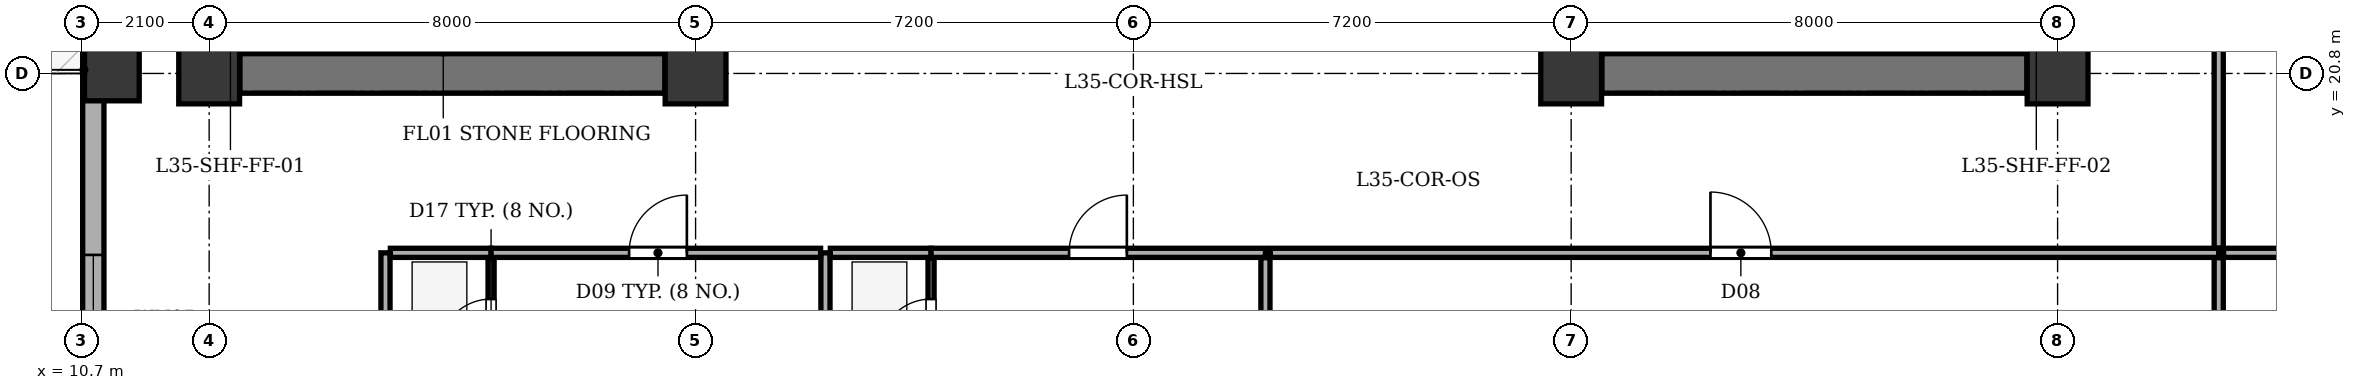
"""IFC4 building model, lengths in metres.
Left out: names, types, materials, properties, quantities, classifications, styles, units other than length and angle.
Written with IfcOpenShell. Run it as: python <this file> out.ifc"""

import sys

from ifc_helpers import new_model, si_unit, direction, frame, frame_2d, origin, origin_2d, place, context, subcontext, project, spatial, rectangle, extrude, element, fill, save


model = new_model("IFC4")
c1 = context("Model", 3, precision=1e-05, world=origin(), true_north=direction((0.0, 1.0)))
c2 = subcontext(c1, "Body", "Model", "MODEL_VIEW")
j1 = project(units=[si_unit("LENGTHUNIT", "METRE"), si_unit("PLANEANGLEUNIT", "RADIAN")], contexts=[c1])
p1 = place(None, origin())
s1 = spatial("IfcSite", under=j1, at=p1, CompositionType="ELEMENT")
p2 = place(p1, origin())
s2 = spatial("IfcBuilding", under=s1, at=p2, CompositionType="ELEMENT")
p3 = place(p2, frame((0.0, 0.0, 141.3)))
s3 = spatial("IfcBuildingStorey", under=s2, at=p3, CompositionType="ELEMENT", Elevation=141.3)
for number, where, z_axis, x_axis in (
    (1, (12.8, 20.8, 0.0), (0.0, 0.0, 1.0), (1.0, 0.0, 0.0)),
    (2, (20.8, 20.8, 0.0), (0.0, 0.0, 1.0), (1.0, 0.0, 0.0)),
    (3, (35.2, 20.8, 0.0), (0.0, 0.0, 1.0), (1.0, 0.0, 0.0)),
    (4, (43.2, 20.8, 0.0), (0.0, 0.0, 1.0), (1.0, 0.0, 0.0)),
):
    element("IfcColumn", number, at=place(p3, frame(where, z_axis=z_axis, x_axis=x_axis)), inside=s3, PredefinedType="COLUMN", context=c2, shape_type="SweptSolid", body=[
        extrude(rectangle(XDim=1.0, YDim=1.0, at=origin_2d()), origin(), (0.0, 0.0, 1.0), 3.5),
    ])
p4 = place(p3, frame((11.2, 20.8, 0.0), z_axis=(0.0, 0.0, 1.0), x_axis=(1.0, 0.0, 0.0)))
e5 = element("IfcColumn", 5, at=p4, inside=s3, PredefinedType="COLUMN", context=c2, shape_type="SweptSolid", body=[
    extrude(rectangle(XDim=0.9, YDim=0.9, at=origin_2d()), origin(), (0.0, 0.0, 1.0), 3.5),
])
p5 = place(p3, frame((10.895, 6.5, 0.0), z_axis=(0.0, 0.0, 1.0), x_axis=(0.0, 1.0, 0.0)))
e6 = element("IfcWall", 6, at=p5, inside=s3, PredefinedType="STANDARD", context=c2, shape_type="SweptSolid", body=[
    extrude(rectangle(XDim=35.0, YDim=0.35, at=frame_2d((17.5, 0.0))), origin(), (0.0, 0.0, 1.0), 2.785),
])
p6 = place(p5, frame((20.15, 0.0, 0.0)))
e7 = element("IfcOpeningElement", 7, at=p6, cuts=e6, PredefinedType="OPENING", context=c2, shape_type="SweptSolid", body=[
    extrude(rectangle(XDim=1.1, YDim=2.05, at=frame_2d((0.55, 1.025))), frame((0.0, 0.185, 0.0), z_axis=(0.0, -1.0, 0.0), x_axis=(1.0, 0.0, 0.0)), (0.0, 0.0, 1.0), 0.37),
])
p7 = place(p5, frame((3.31, 0.0, 0.75)))
e8 = element("IfcOpeningElement", 8, at=p7, cuts=e6, PredefinedType="OPENING", context=c2, shape_type="SweptSolid", body=[
    extrude(rectangle(XDim=1.6, YDim=1.75, at=frame_2d((0.8, 0.875))), frame((0.0, 0.185, 0.0), z_axis=(0.0, -1.0, 0.0), x_axis=(1.0, 0.0, 0.0)), (0.0, 0.0, 1.0), 0.37),
])
p8 = place(p5, frame((9.216, 0.0, 0.75)))
e9 = element("IfcOpeningElement", 9, at=p8, cuts=e6, PredefinedType="OPENING", context=c2, shape_type="SweptSolid", body=[
    extrude(rectangle(XDim=2.1, YDim=1.75, at=frame_2d((1.05, 0.875))), frame((0.0, 0.185, 0.0), z_axis=(0.0, -1.0, 0.0), x_axis=(1.0, 0.0, 0.0)), (0.0, 0.0, 1.0), 0.37),
])
p9 = place(p5, frame((16.4, 0.0, 0.75)))
e10 = element("IfcOpeningElement", 10, at=p9, cuts=e6, PredefinedType="OPENING", context=c2, shape_type="SweptSolid", body=[
    extrude(rectangle(XDim=1.6, YDim=1.75, at=frame_2d((0.8, 0.875))), frame((0.0, 0.185, 0.0), z_axis=(0.0, -1.0, 0.0), x_axis=(1.0, 0.0, 0.0)), (0.0, 0.0, 1.0), 0.37),
])
p10 = place(p5, frame((23.4, 0.0, 0.75)))
e11 = element("IfcOpeningElement", 11, at=p10, cuts=e6, PredefinedType="OPENING", context=c2, shape_type="SweptSolid", body=[
    extrude(rectangle(XDim=1.6, YDim=1.75, at=frame_2d((0.8, 0.875))), frame((0.0, 0.185, 0.0), z_axis=(0.0, -1.0, 0.0), x_axis=(1.0, 0.0, 0.0)), (0.0, 0.0, 1.0), 0.37),
])
p11 = place(p5, frame((28.671, 0.0, 0.75)))
e12 = element("IfcOpeningElement", 12, at=p11, cuts=e6, PredefinedType="OPENING", context=c2, shape_type="SweptSolid", body=[
    extrude(rectangle(XDim=1.6, YDim=1.75, at=frame_2d((0.8, 0.875))), frame((0.0, 0.185, 0.0), z_axis=(0.0, -1.0, 0.0), x_axis=(1.0, 0.0, 0.0)), (0.0, 0.0, 1.0), 0.37),
])
p12 = place(p5, frame((31.755, 0.0, 0.75)))
e13 = element("IfcOpeningElement", 13, at=p12, cuts=e6, PredefinedType="OPENING", context=c2, shape_type="SweptSolid", body=[
    extrude(rectangle(XDim=1.6, YDim=1.75, at=frame_2d((0.8, 0.875))), frame((0.0, 0.185, 0.0), z_axis=(0.0, -1.0, 0.0), x_axis=(1.0, 0.0, 0.0)), (0.0, 0.0, 1.0), 0.37),
])
p13 = place(p3, frame((13.305, 20.8, 0.0), z_axis=(0.0, 0.0, 1.0), x_axis=(1.0, 0.0, 0.0)))
e14 = element("IfcWall", 14, at=p13, inside=s3, PredefinedType="SHEAR", context=c2, shape_type="SweptSolid", body=[
    extrude(rectangle(XDim=6.99, YDim=0.65, at=frame_2d((3.495, 0.0))), origin(), (0.0, 0.0, 1.0), 3.2),
])
p14 = place(p3, frame((16.435, 21.135, 0.0), z_axis=(0.0, 0.0, 1.0), x_axis=(0.0, 1.0, 0.0)))
e15 = element("IfcWall", 15, at=p14, inside=s3, PredefinedType="SHEAR", context=c2, shape_type="SweptSolid", body=[
    extrude(rectangle(XDim=12.13, YDim=0.25, at=frame_2d((6.065, 0.0))), origin(), (0.0, 0.0, 1.0), 3.2),
])
p15 = place(p14, frame((0.515, 0.0, 0.0)))
e16 = element("IfcOpeningElement", 16, at=p15, cuts=e15, PredefinedType="OPENING", context=c2, shape_type="SweptSolid", body=[
    extrude(rectangle(XDim=1.2, YDim=2.15, at=frame_2d((0.6, 1.075))), frame((0.0, 0.135, 0.0), z_axis=(0.0, -1.0, 0.0), x_axis=(1.0, 0.0, 0.0)), (0.0, 0.0, 1.0), 0.27),
])
p16 = place(p14, frame((2.665, 0.0, 0.0)))
e17 = element("IfcOpeningElement", 17, at=p16, cuts=e15, PredefinedType="OPENING", context=c2, shape_type="SweptSolid", body=[
    extrude(rectangle(XDim=1.15, YDim=2.15, at=frame_2d((0.575, 1.075))), frame((0.0, 0.135, 0.0), z_axis=(0.0, -1.0, 0.0), x_axis=(1.0, 0.0, 0.0)), (0.0, 0.0, 1.0), 0.27),
])
p17 = place(p3, frame((35.705, 20.8, 0.0), z_axis=(0.0, 0.0, 1.0), x_axis=(1.0, 0.0, 0.0)))
e18 = element("IfcWall", 18, at=p17, inside=s3, PredefinedType="SHEAR", context=c2, shape_type="SweptSolid", body=[
    extrude(rectangle(XDim=6.99, YDim=0.65, at=frame_2d((3.495, 0.0))), origin(), (0.0, 0.0, 1.0), 3.2),
])
p18 = place(p3, frame((39.565, 21.135, 0.0), z_axis=(0.0, 0.0, 1.0), x_axis=(0.0, 1.0, 0.0)))
e19 = element("IfcWall", 19, at=p18, inside=s3, PredefinedType="SHEAR", context=c2, shape_type="SweptSolid", body=[
    extrude(rectangle(XDim=12.13, YDim=0.25, at=frame_2d((6.065, 0.0))), origin(), (0.0, 0.0, 1.0), 3.2),
])
p19 = place(p18, frame((0.515, 0.0, 0.0)))
e20 = element("IfcOpeningElement", 20, at=p19, cuts=e19, PredefinedType="OPENING", context=c2, shape_type="SweptSolid", body=[
    extrude(rectangle(XDim=1.2, YDim=2.15, at=frame_2d((0.6, 1.075))), frame((0.0, 0.135, 0.0), z_axis=(0.0, -1.0, 0.0), x_axis=(1.0, 0.0, 0.0)), (0.0, 0.0, 1.0), 0.27),
])
p20 = place(p18, frame((2.665, 0.0, 0.0)))
e21 = element("IfcOpeningElement", 21, at=p20, cuts=e19, PredefinedType="OPENING", context=c2, shape_type="SweptSolid", body=[
    extrude(rectangle(XDim=1.15, YDim=2.15, at=frame_2d((0.575, 1.075))), frame((0.0, 0.135, 0.0), z_axis=(0.0, -1.0, 0.0), x_axis=(1.0, 0.0, 0.0)), (0.0, 0.0, 1.0), 0.27),
])
for number, where, z_axis, x_axis in (
    (22, (15.7, 1.875, 0.0), (0.0, 0.0, 1.0), (0.0, 1.0, 0.0)),
    (23, (22.936, 1.875, 0.0), (0.0, 0.0, 1.0), (0.0, 1.0, 0.0)),
):
    element("IfcWall", number, at=place(p3, frame(where, z_axis=z_axis, x_axis=x_axis)), inside=s3, PredefinedType="PARTITIONING", context=c2, shape_type="SweptSolid", body=[
        extrude(rectangle(XDim=15.975, YDim=0.15, at=frame_2d((7.988, 0.0))), origin(), (0.0, 0.0, 1.0), 3.2),
    ])
p21 = place(p3, frame((15.78, 17.85, 0.0), z_axis=(0.0, 0.0, 1.0), x_axis=(1.0, 0.0, 0.0)))
e24 = element("IfcWall", 24, at=p21, inside=s3, PredefinedType="PARTITIONING", context=c2, shape_type="SweptSolid", body=[
    extrude(rectangle(XDim=1.656, YDim=0.15, at=frame_2d((0.828, 0.0))), origin(), (0.0, 0.0, 1.0), 3.2),
])
p22 = place(p3, frame((17.437, 17.85, 0.0), z_axis=(0.0, 0.0, 1.0), x_axis=(1.0, 0.0, 0.0)))
e25 = element("IfcWall", 25, at=p22, inside=s3, PredefinedType="PARTITIONING", context=c2, shape_type="SweptSolid", body=[
    extrude(rectangle(XDim=5.419, YDim=0.15, at=frame_2d((2.71, 0.0))), origin(), (0.0, 0.0, 1.0), 3.2),
])
p23 = place(p22, frame((2.27, 0.0, 0.0)))
e26 = element("IfcOpeningElement", 26, at=p23, cuts=e25, PredefinedType="OPENING", context=c2, shape_type="SweptSolid", body=[
    extrude(rectangle(XDim=0.95, YDim=2.1, at=frame_2d((0.475, 1.05))), frame((0.0, 0.085, 0.0), z_axis=(0.0, -1.0, 0.0), x_axis=(1.0, 0.0, 0.0)), (0.0, 0.0, 1.0), 0.17),
])
p24 = place(p3, frame((17.437, 15.52, 0.0), z_axis=(0.0, 0.0, 1.0), x_axis=(0.0, 1.0, 0.0)))
e27 = element("IfcWall", 27, at=p24, inside=s3, PredefinedType="PARTITIONING", context=c2, shape_type="SweptSolid", body=[
    extrude(rectangle(XDim=2.25, YDim=0.1, at=frame_2d((1.125, 0.0))), origin(), (0.0, 0.0, 1.0), 3.2),
])
p25 = place(p24, frame((0.72, 0.0, 0.0)))
e28 = element("IfcOpeningElement", 28, at=p25, cuts=e27, PredefinedType="OPENING", context=c2, shape_type="SweptSolid", body=[
    extrude(rectangle(XDim=0.85, YDim=2.05, at=frame_2d((0.425, 1.025))), frame((0.0, 0.06, 0.0), z_axis=(0.0, -1.0, 0.0), x_axis=(1.0, 0.0, 0.0)), (0.0, 0.0, 1.0), 0.12),
])
p26 = place(p3, frame((23.016, 17.85, 0.0), z_axis=(0.0, 0.0, 1.0), x_axis=(1.0, 0.0, 0.0)))
e29 = element("IfcWall", 29, at=p26, inside=s3, PredefinedType="PARTITIONING", context=c2, shape_type="SweptSolid", body=[
    extrude(rectangle(XDim=1.656, YDim=0.15, at=frame_2d((0.828, 0.0))), origin(), (0.0, 0.0, 1.0), 3.2),
])
p27 = place(p3, frame((24.673, 17.85, 0.0), z_axis=(0.0, 0.0, 1.0), x_axis=(1.0, 0.0, 0.0)))
e30 = element("IfcWall", 30, at=p27, inside=s3, PredefinedType="PARTITIONING", context=c2, shape_type="SweptSolid", body=[
    extrude(rectangle(XDim=5.5, YDim=0.15, at=frame_2d((2.75, 0.0))), origin(), (0.0, 0.0, 1.0), 3.2),
])
p28 = place(p27, frame((2.27, 0.0, 0.0)))
e31 = element("IfcOpeningElement", 31, at=p28, cuts=e30, PredefinedType="OPENING", context=c2, shape_type="SweptSolid", body=[
    extrude(rectangle(XDim=0.95, YDim=2.1, at=frame_2d((0.475, 1.05))), frame((0.0, 0.085, 0.0), z_axis=(0.0, -1.0, 0.0), x_axis=(1.0, 0.0, 0.0)), (0.0, 0.0, 1.0), 0.17),
])
p29 = place(p3, frame((24.673, 15.52, 0.0), z_axis=(0.0, 0.0, 1.0), x_axis=(0.0, 1.0, 0.0)))
e32 = element("IfcWall", 32, at=p29, inside=s3, PredefinedType="PARTITIONING", context=c2, shape_type="SweptSolid", body=[
    extrude(rectangle(XDim=2.25, YDim=0.1, at=frame_2d((1.125, 0.0))), origin(), (0.0, 0.0, 1.0), 3.2),
])
p30 = place(p29, frame((0.72, 0.0, 0.0)))
e33 = element("IfcOpeningElement", 33, at=p30, cuts=e32, PredefinedType="OPENING", context=c2, shape_type="SweptSolid", body=[
    extrude(rectangle(XDim=0.85, YDim=2.05, at=frame_2d((0.425, 1.025))), frame((0.0, 0.06, 0.0), z_axis=(0.0, -1.0, 0.0), x_axis=(1.0, 0.0, 0.0)), (0.0, 0.0, 1.0), 0.12),
])
p31 = place(p3, frame((30.172, 1.875, 0.0), z_axis=(0.0, 0.0, 1.0), x_axis=(0.0, 1.0, 0.0)))
e34 = element("IfcWall", 34, at=p31, inside=s3, PredefinedType="PARTITIONING", context=c2, shape_type="SweptSolid", body=[
    extrude(rectangle(XDim=15.895, YDim=0.15, at=frame_2d((7.948, 0.0))), origin(), (0.0, 0.0, 1.0), 3.2),
])
p32 = place(p3, frame((30.252, 17.85, 0.0), z_axis=(0.0, 0.0, 1.0), x_axis=(1.0, 0.0, 0.0)))
e35 = element("IfcWall", 35, at=p32, inside=s3, PredefinedType="PARTITIONING", context=c2, shape_type="SweptSolid", body=[
    extrude(rectangle(XDim=15.598, YDim=0.15, at=frame_2d((7.799, 0.0))), origin(), (0.0, 0.0, 1.0), 3.2),
])
p33 = place(p32, frame((7.239, 0.0, 0.0)))
e36 = element("IfcOpeningElement", 36, at=p33, cuts=e35, PredefinedType="OPENING", context=c2, shape_type="SweptSolid", body=[
    extrude(rectangle(XDim=1.0, YDim=2.1, at=frame_2d((0.5, 1.05))), frame((0.0, 0.085, 0.0), z_axis=(0.0, -1.0, 0.0), x_axis=(1.0, 0.0, 0.0)), (0.0, 0.0, 1.0), 0.17),
])
p34 = place(p3, frame((45.85, 1.875, 0.0), z_axis=(0.0, 0.0, 1.0), x_axis=(0.0, 1.0, 0.0)))
e37 = element("IfcWall", 37, at=p34, inside=s3, PredefinedType="PARTITIONING", context=c2, shape_type="SweptSolid", body=[
    extrude(rectangle(XDim=15.895, YDim=0.15, at=frame_2d((7.948, 0.0))), origin(), (0.0, 0.0, 1.0), 3.2),
])
p35 = place(p3, frame((45.93, 17.85, 0.0), z_axis=(0.0, 0.0, 1.0), x_axis=(1.0, 0.0, 0.0)))
e38 = element("IfcWall", 38, at=p35, inside=s3, PredefinedType="PARTITIONING", context=c2, shape_type="SweptSolid", body=[
    extrude(rectangle(XDim=9.395, YDim=0.15, at=frame_2d((4.698, 0.0))), origin(), (0.0, 0.0, 1.0), 3.2),
])
p36 = place(p3, frame((45.85, 17.93, 0.0), z_axis=(0.0, 0.0, 1.0), x_axis=(0.0, 1.0, 0.0)))
e39 = element("IfcWall", 39, at=p36, inside=s3, PredefinedType="PARTITIONING", context=c2, shape_type="SweptSolid", body=[
    extrude(rectangle(XDim=18.54, YDim=0.15, at=frame_2d((9.27, 0.0))), origin(), (0.0, 0.0, 1.0), 3.2),
])
p37 = place(p36, frame((8.79, 0.0, 0.0)))
e40 = element("IfcOpeningElement", 40, at=p37, cuts=e39, PredefinedType="OPENING", context=c2, shape_type="SweptSolid", body=[
    extrude(rectangle(XDim=0.95, YDim=2.1, at=frame_2d((0.475, 1.05))), frame((0.0, 0.085, 0.0), z_axis=(0.0, -1.0, 0.0), x_axis=(1.0, 0.0, 0.0)), (0.0, 0.0, 1.0), 0.17),
])
p38 = place(p8, origin())
e41 = element("IfcWindow", 41, at=p38, inside=s3, PartitioningType="SINGLE_PANEL", PredefinedType="WINDOW", context=c2, shape_type="SweptSolid", body=[
    extrude(rectangle(XDim=2.1, YDim=1.75, at=frame_2d((1.05, 0.875))), frame((0.0, -0.01, 0.0), z_axis=(0.0, -1.0, 0.0), x_axis=(1.0, 0.0, 0.0)), (0.0, 0.0, 1.0), 0.06),
])
fill(e9, e41)
p39 = place(p25, origin())
e42 = element("IfcDoor", 42, at=p39, inside=s3, OperationType="SINGLE_SWING_LEFT", PredefinedType="DOOR", context=c2, shape_type="SweptSolid", body=[
    extrude(rectangle(XDim=0.85, YDim=2.05, at=frame_2d((0.425, 1.025))), frame((0.0, 0.025, 0.0), z_axis=(0.0, -1.0, 0.0), x_axis=(1.0, 0.0, 0.0)), (0.0, 0.0, 1.0), 0.05),
])
fill(e28, e42)
p40 = place(p23, origin())
e43 = element("IfcDoor", 43, at=p40, inside=s3, OperationType="SINGLE_SWING_RIGHT", PredefinedType="DOOR", context=c2, shape_type="SweptSolid", body=[
    extrude(rectangle(XDim=0.95, YDim=2.1, at=frame_2d((0.475, 1.05))), frame((0.0, 0.025, 0.0), z_axis=(0.0, -1.0, 0.0), x_axis=(1.0, 0.0, 0.0)), (0.0, 0.0, 1.0), 0.05),
])
fill(e26, e43)
p41 = place(p30, origin())
e44 = element("IfcDoor", 44, at=p41, inside=s3, OperationType="SINGLE_SWING_LEFT", PredefinedType="DOOR", context=c2, shape_type="SweptSolid", body=[
    extrude(rectangle(XDim=0.85, YDim=2.05, at=frame_2d((0.425, 1.025))), frame((0.0, 0.025, 0.0), z_axis=(0.0, -1.0, 0.0), x_axis=(1.0, 0.0, 0.0)), (0.0, 0.0, 1.0), 0.05),
])
fill(e33, e44)
p42 = place(p28, origin())
e45 = element("IfcDoor", 45, at=p42, inside=s3, OperationType="SINGLE_SWING_RIGHT", PredefinedType="DOOR", context=c2, shape_type="SweptSolid", body=[
    extrude(rectangle(XDim=0.95, YDim=2.1, at=frame_2d((0.475, 1.05))), frame((0.0, 0.025, 0.0), z_axis=(0.0, -1.0, 0.0), x_axis=(1.0, 0.0, 0.0)), (0.0, 0.0, 1.0), 0.05),
])
fill(e31, e45)
p43 = place(p33, origin())
e46 = element("IfcDoor", 46, at=p43, inside=s3, OperationType="SINGLE_SWING_LEFT", PredefinedType="DOOR", context=c2, shape_type="SweptSolid", body=[
    extrude(rectangle(XDim=1.0, YDim=2.1, at=frame_2d((0.5, 1.05))), frame((0.0, 0.025, 0.0), z_axis=(0.0, -1.0, 0.0), x_axis=(1.0, 0.0, 0.0)), (0.0, 0.0, 1.0), 0.05),
])
fill(e36, e46)
save(model, sys.argv[1])
